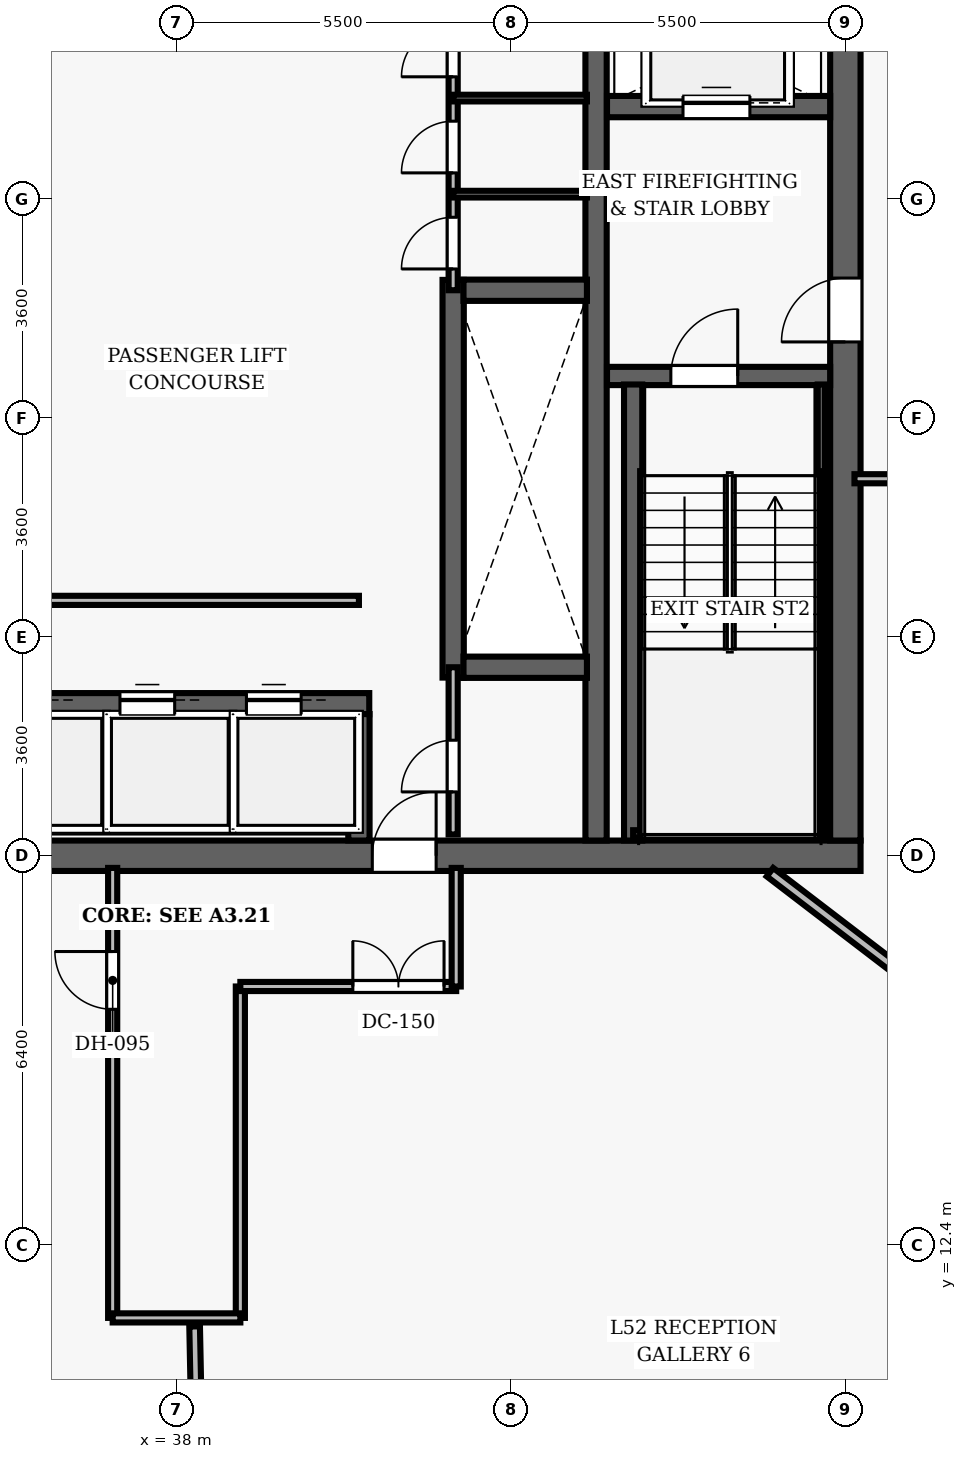
"""IFC4 building model, lengths in metres.
Left out: names, types, materials, properties, quantities, classifications, styles, units other than length and angle.
Written with IfcOpenShell. Run it as: python <this file> out.ifc"""

import sys

from ifc_helpers import new_model, si_unit, direction, frame, frame_2d, origin, place, context, subcontext, project, spatial, rectangle, extrude, element, fill, save


model = new_model("IFC4")
c1 = context("Model", 3, precision=1e-05, world=origin(), true_north=direction((0.0, 1.0)))
c2 = subcontext(c1, "Body", "Model", "MODEL_VIEW")
j1 = project(units=[si_unit("LENGTHUNIT", "METRE"), si_unit("PLANEANGLEUNIT", "RADIAN")], contexts=[c1])
p1 = place(None, origin())
s1 = spatial("IfcSite", under=j1, at=p1, CompositionType="ELEMENT")
p2 = place(p1, origin())
s2 = spatial("IfcBuilding", under=s1, at=p2, CompositionType="ELEMENT")
p3 = place(p2, frame((0.0, 0.0, 205.85)))
s3 = spatial("IfcBuildingStorey", under=s2, at=p3, CompositionType="ELEMENT", Elevation=205.85)
p4 = place(p3, frame((26.75, 18.8, 0.0), z_axis=(0.0, 0.0, 1.0), x_axis=(1.0, 0.0, 0.0)))
e1 = element("IfcWall", 1, at=p4, inside=s3, PredefinedType="SHEAR", context=c2, shape_type="SweptSolid", body=[
    extrude(rectangle(XDim=22.5, YDim=0.5, at=frame_2d((11.25, 0.0))), origin(), (0.0, 0.0, 1.0), 3.85),
])
p5 = place(p4, frame((14.47, 0.0, 0.0)))
e2 = element("IfcOpeningElement", 2, at=p5, cuts=e1, PredefinedType="OPENING", context=c2, shape_type="SweptSolid", body=[
    extrude(rectangle(XDim=1.05, YDim=2.15, at=frame_2d((0.525, 1.075))), frame((0.0, 0.26, 0.0), z_axis=(0.0, -1.0, 0.0), x_axis=(1.0, 0.0, 0.0)), (0.0, 0.0, 1.0), 0.52),
])
p6 = place(p3, frame((49.0, 19.05, 0.0), z_axis=(0.0, 0.0, 1.0), x_axis=(0.0, 1.0, 0.0)))
e3 = element("IfcWall", 3, at=p6, inside=s3, PredefinedType="SHEAR", context=c2, shape_type="SweptSolid", body=[
    extrude(rectangle(XDim=13.9, YDim=0.5, at=frame_2d((6.95, 0.0))), origin(), (0.0, 0.0, 1.0), 3.85),
])
p7 = place(p6, frame((8.2, 0.0, 0.0)))
e4 = element("IfcOpeningElement", 4, at=p7, cuts=e3, PredefinedType="OPENING", context=c2, shape_type="SweptSolid", body=[
    extrude(rectangle(XDim=1.05, YDim=2.15, at=frame_2d((0.525, 1.075))), frame((0.0, 0.26, 0.0), z_axis=(0.0, -1.0, 0.0), x_axis=(1.0, 0.0, 0.0)), (0.0, 0.0, 1.0), 0.52),
])
p8 = place(p3, frame((44.9, 19.05, 0.0), z_axis=(0.0, 0.0, 1.0), x_axis=(0.0, 1.0, 0.0)))
e5 = element("IfcWall", 5, at=p8, inside=s3, PredefinedType="SHEAR", context=c2, shape_type="SweptSolid", body=[
    extrude(rectangle(XDim=13.9, YDim=0.35, at=frame_2d((6.95, 0.0))), origin(), (0.0, 0.0, 1.0), 3.85),
])
p9 = place(p3, frame((45.08, 26.69, 0.0), z_axis=(0.0, 0.0, 1.0), x_axis=(1.0, 0.0, 0.0)))
e6 = element("IfcWall", 6, at=p9, inside=s3, PredefinedType="SHEAR", context=c2, shape_type="SweptSolid", body=[
    extrude(rectangle(XDim=3.67, YDim=0.3, at=frame_2d((1.835, 0.0))), origin(), (0.0, 0.0, 1.0), 3.85),
])
p10 = place(p9, frame((1.05, 0.0, 0.0)))
e7 = element("IfcOpeningElement", 7, at=p10, cuts=e6, PredefinedType="OPENING", context=c2, shape_type="SweptSolid", body=[
    extrude(rectangle(XDim=1.1, YDim=2.15, at=frame_2d((0.55, 1.075))), frame((0.0, 0.16, 0.0), z_axis=(0.0, -1.0, 0.0), x_axis=(1.0, 0.0, 0.0)), (0.0, 0.0, 1.0), 0.32),
])
p11 = place(p3, frame((45.51, 19.05, 0.0), z_axis=(0.0, 0.0, 1.0), x_axis=(0.0, 1.0, 0.0)))
e8 = element("IfcWall", 8, at=p11, inside=s3, PredefinedType="SHEAR", context=c2, shape_type="SweptSolid", body=[
    extrude(rectangle(XDim=7.5, YDim=0.3, at=frame_2d((3.75, 0.0))), origin(), (0.0, 0.0, 1.0), 3.85),
])
p12 = place(p3, frame((48.605, 19.1, 0.0), z_axis=(0.0, 0.0, 1.0), x_axis=(0.0, 1.0, 0.0)))
e9 = element("IfcWall", 9, at=p12, inside=s3, PredefinedType="SHEAR", context=c2, shape_type="SweptSolid", body=[
    extrude(rectangle(XDim=7.45, YDim=0.12, at=frame_2d((3.725, 0.0))), origin(), (0.0, 0.0, 1.0), 3.85),
])
p13 = place(p3, frame((45.51, 19.16, 0.0), z_axis=(0.0, 0.0, 1.0), x_axis=(1.0, 0.0, 0.0)))
e10 = element("IfcWall", 10, at=p13, inside=s3, PredefinedType="SHEAR", context=c2, shape_type="SweptSolid", body=[
    extrude(rectangle(XDim=3.095, YDim=0.12, at=frame_2d((1.547, 0.0))), origin(), (0.0, 0.0, 1.0), 3.85),
])
p14 = place(p3, frame((45.08, 31.12, 0.0), z_axis=(0.0, 0.0, 1.0), x_axis=(1.0, 0.0, 0.0)))
e11 = element("IfcWall", 11, at=p14, inside=s3, PredefinedType="SHEAR", context=c2, shape_type="SweptSolid", body=[
    extrude(rectangle(XDim=3.67, YDim=0.35, at=frame_2d((1.835, 0.0))), origin(), (0.0, 0.0, 1.0), 3.035),
])
p15 = place(p14, frame((1.25, 0.0, 0.0)))
e12 = element("IfcOpeningElement", 12, at=p15, cuts=e11, PredefinedType="OPENING", context=c2, shape_type="SweptSolid", body=[
    extrude(rectangle(XDim=1.1, YDim=2.15, at=frame_2d((0.55, 1.075))), frame((0.0, 0.185, 0.0), z_axis=(0.0, -1.0, 0.0), x_axis=(1.0, 0.0, 0.0)), (0.0, 0.0, 1.0), 0.37),
])
p16 = place(p3, frame((42.55, 21.73, 0.0), z_axis=(0.0, 0.0, 1.0), x_axis=(0.0, 1.0, 0.0)))
e13 = element("IfcWall", 13, at=p16, inside=s3, PredefinedType="SHEAR", context=c2, shape_type="SweptSolid", body=[
    extrude(rectangle(XDim=6.54, YDim=0.35, at=frame_2d((3.27, 0.0))), origin(), (0.0, 0.0, 1.0), 3.035),
])
for number, where, z_axis, x_axis in (
    (14, (42.72, 21.9, 0.0), (0.0, 0.0, 1.0), (1.0, 0.0, 0.0)),
    (15, (42.72, 28.1, 0.0), (0.0, 0.0, 1.0), (1.0, 0.0, 0.0)),
):
    element("IfcWall", number, at=place(p3, frame(where, z_axis=z_axis, x_axis=x_axis)), inside=s3, PredefinedType="SHEAR", context=c2, shape_type="SweptSolid", body=[
        extrude(rectangle(XDim=2.03, YDim=0.35, at=frame_2d((1.015, 0.0))), origin(), (0.0, 0.0, 1.0), 3.035),
    ])
p17 = place(p3, frame((34.49, 21.3, 0.0), z_axis=(0.0, 0.0, 1.0), x_axis=(1.0, 0.0, 0.0)))
e16 = element("IfcWall", 16, at=p17, inside=s3, PredefinedType="SHEAR", context=c2, shape_type="SweptSolid", body=[
    extrude(rectangle(XDim=6.68, YDim=0.35, at=frame_2d((3.34, 0.0))), origin(), (0.0, 0.0, 1.0), 3.035),
])
p18 = place(p17, frame((0.5, 0.0, 0.0)))
e17 = element("IfcOpeningElement", 17, at=p18, cuts=e16, PredefinedType="OPENING", context=c2, shape_type="SweptSolid", body=[
    extrude(rectangle(XDim=0.9, YDim=2.15, at=frame_2d((0.45, 1.075))), frame((0.0, 0.185, 0.0), z_axis=(0.0, -1.0, 0.0), x_axis=(1.0, 0.0, 0.0)), (0.0, 0.0, 1.0), 0.37),
])
p19 = place(p17, frame((2.58, 0.0, 0.0)))
e18 = element("IfcOpeningElement", 18, at=p19, cuts=e16, PredefinedType="OPENING", context=c2, shape_type="SweptSolid", body=[
    extrude(rectangle(XDim=0.9, YDim=2.15, at=frame_2d((0.45, 1.075))), frame((0.0, 0.185, 0.0), z_axis=(0.0, -1.0, 0.0), x_axis=(1.0, 0.0, 0.0)), (0.0, 0.0, 1.0), 0.37),
])
p20 = place(p17, frame((4.66, 0.0, 0.0)))
e19 = element("IfcOpeningElement", 19, at=p20, cuts=e16, PredefinedType="OPENING", context=c2, shape_type="SweptSolid", body=[
    extrude(rectangle(XDim=0.9, YDim=2.15, at=frame_2d((0.45, 1.075))), frame((0.0, 0.185, 0.0), z_axis=(0.0, -1.0, 0.0), x_axis=(1.0, 0.0, 0.0)), (0.0, 0.0, 1.0), 0.37),
])
p21 = place(p3, frame((41.0, 19.05, 0.0), z_axis=(0.0, 0.0, 1.0), x_axis=(0.0, 1.0, 0.0)))
e20 = element("IfcWall", 20, at=p21, inside=s3, PredefinedType="SHEAR", context=c2, shape_type="SweptSolid", body=[
    extrude(rectangle(XDim=2.08, YDim=0.35, at=frame_2d((1.04, 0.0))), origin(), (0.0, 0.0, 1.0), 3.035),
])
p22 = place(p3, frame((34.75, 23.0, 0.0), z_axis=(0.0, 0.0, 1.0), x_axis=(1.0, 0.0, 0.0)))
e21 = element("IfcWall", 21, at=p22, inside=s3, PredefinedType="PARTITIONING", context=c2, shape_type="SweptSolid", body=[
    extrude(rectangle(XDim=6.25, YDim=0.15, at=frame_2d((3.125, 0.0))), origin(), (0.0, 0.0, 1.0), 3.035),
])
p23 = place(p3, frame((42.55, 28.1, 0.0), z_axis=(0.0, 0.0, 1.0), x_axis=(0.0, 1.0, 0.0)))
e22 = element("IfcWall", 22, at=p23, inside=s3, PredefinedType="PARTITIONING", context=c2, shape_type="SweptSolid", body=[
    extrude(rectangle(XDim=4.75, YDim=0.15, at=frame_2d((2.375, 0.0))), origin(), (0.0, 0.0, 1.0), 3.035),
])
p24 = place(p23, frame((0.35, 0.0, 0.0)))
e23 = element("IfcOpeningElement", 23, at=p24, cuts=e22, PredefinedType="OPENING", context=c2, shape_type="SweptSolid", body=[
    extrude(rectangle(XDim=0.85, YDim=2.1, at=frame_2d((0.425, 1.05))), frame((0.0, 0.085, 0.0), z_axis=(0.0, -1.0, 0.0), x_axis=(1.0, 0.0, 0.0)), (0.0, 0.0, 1.0), 0.17),
])
p25 = place(p23, frame((1.93, 0.0, 0.0)))
e24 = element("IfcOpeningElement", 24, at=p25, cuts=e22, PredefinedType="OPENING", context=c2, shape_type="SweptSolid", body=[
    extrude(rectangle(XDim=0.85, YDim=2.1, at=frame_2d((0.425, 1.05))), frame((0.0, 0.085, 0.0), z_axis=(0.0, -1.0, 0.0), x_axis=(1.0, 0.0, 0.0)), (0.0, 0.0, 1.0), 0.17),
])
p26 = place(p23, frame((3.51, 0.0, 0.0)))
e25 = element("IfcOpeningElement", 25, at=p26, cuts=e22, PredefinedType="OPENING", context=c2, shape_type="SweptSolid", body=[
    extrude(rectangle(XDim=0.85, YDim=2.1, at=frame_2d((0.425, 1.05))), frame((0.0, 0.085, 0.0), z_axis=(0.0, -1.0, 0.0), x_axis=(1.0, 0.0, 0.0)), (0.0, 0.0, 1.0), 0.17),
])
for number, where, z_axis, x_axis in (
    (26, (42.55, 29.68, 0.0), (0.0, 0.0, 1.0), (1.0, 0.0, 0.0)),
    (27, (42.55, 31.26, 0.0), (0.0, 0.0, 1.0), (1.0, 0.0, 0.0)),
):
    element("IfcWall", number, at=place(p3, frame(where, z_axis=z_axis, x_axis=x_axis)), inside=s3, PredefinedType="PARTITIONING", context=c2, shape_type="SweptSolid", body=[
        extrude(rectangle(XDim=2.2, YDim=0.11, at=frame_2d((1.1, 0.0))), origin(), (0.0, 0.0, 1.0), 3.035),
    ])
p27 = place(p3, frame((42.55, 19.15, 0.0), z_axis=(0.0, 0.0, 1.0), x_axis=(0.0, 1.0, 0.0)))
e28 = element("IfcWall", 28, at=p27, inside=s3, PredefinedType="PARTITIONING", context=c2, shape_type="SweptSolid", body=[
    extrude(rectangle(XDim=2.75, YDim=0.15, at=frame_2d((1.375, 0.0))), origin(), (0.0, 0.0, 1.0), 3.035),
])
p28 = place(p27, frame((0.7, 0.0, 0.0)))
e29 = element("IfcOpeningElement", 29, at=p28, cuts=e28, PredefinedType="OPENING", context=c2, shape_type="SweptSolid", body=[
    extrude(rectangle(XDim=0.85, YDim=2.1, at=frame_2d((0.425, 1.05))), frame((0.0, 0.085, 0.0), z_axis=(0.0, -1.0, 0.0), x_axis=(1.0, 0.0, 0.0)), (0.0, 0.0, 1.0), 0.17),
])
p29 = place(p3, frame((49.15, 25.0, 0.0), z_axis=(0.0, 0.0, 1.0), x_axis=(1.0, 0.0, 0.0)))
e30 = element("IfcWall", 30, at=p29, inside=s3, PredefinedType="PARTITIONING", context=c2, shape_type="SweptSolid", body=[
    extrude(rectangle(XDim=9.038, YDim=0.15, at=frame_2d((4.519, 0.0))), origin(), (0.0, 0.0, 1.0), 3.035),
])
p30 = place(p29, frame((1.784, 0.0, 0.0)))
e31 = element("IfcOpeningElement", 31, at=p30, cuts=e30, PredefinedType="OPENING", context=c2, shape_type="SweptSolid", body=[
    extrude(rectangle(XDim=0.95, YDim=2.15, at=frame_2d((0.475, 1.075))), frame((0.0, 0.085, 0.0), z_axis=(0.0, -1.0, 0.0), x_axis=(1.0, 0.0, 0.0)), (0.0, 0.0, 1.0), 0.17),
])
p31 = place(p3, frame((36.95, 11.2, 0.0), z_axis=(0.0, 0.0, 1.0), x_axis=(0.0, 1.0, 0.0)))
e32 = element("IfcWall", 32, at=p31, inside=s3, PredefinedType="PARTITIONING", context=c2, shape_type="SweptSolid", body=[
    extrude(rectangle(XDim=7.4, YDim=0.15, at=frame_2d((3.7, 0.0))), origin(), (0.0, 0.0, 1.0), 3.035),
])
p32 = place(p31, frame((5.075, 0.0, 0.0)))
e33 = element("IfcOpeningElement", 33, at=p32, cuts=e32, PredefinedType="OPENING", context=c2, shape_type="SweptSolid", body=[
    extrude(rectangle(XDim=0.95, YDim=2.15, at=frame_2d((0.475, 1.075))), frame((0.0, 0.085, 0.0), z_axis=(0.0, -1.0, 0.0), x_axis=(1.0, 0.0, 0.0)), (0.0, 0.0, 1.0), 0.17),
])
p33 = place(p3, frame((39.05, 11.2, 0.0), z_axis=(0.0, 0.0, 1.0), x_axis=(0.0, 1.0, 0.0)))
e34 = element("IfcWall", 34, at=p33, inside=s3, PredefinedType="PARTITIONING", context=c2, shape_type="SweptSolid", body=[
    extrude(rectangle(XDim=5.45, YDim=0.15, at=frame_2d((2.725, 0.0))), origin(), (0.0, 0.0, 1.0), 3.035),
])
p34 = place(p3, frame((39.05, 16.65, 0.0), z_axis=(0.0, 0.0, 1.0), x_axis=(1.0, 0.0, 0.0)))
e35 = element("IfcWall", 35, at=p34, inside=s3, PredefinedType="PARTITIONING", context=c2, shape_type="SweptSolid", body=[
    extrude(rectangle(XDim=3.55, YDim=0.15, at=frame_2d((1.775, 0.0))), origin(), (0.0, 0.0, 1.0), 3.035),
])
p35 = place(p34, frame((1.85, 0.0, 0.0)))
e36 = element("IfcOpeningElement", 36, at=p35, cuts=e35, PredefinedType="OPENING", context=c2, shape_type="SweptSolid", body=[
    extrude(rectangle(XDim=1.5, YDim=2.2, at=frame_2d((0.75, 1.1))), frame((0.0, 0.085, 0.0), z_axis=(0.0, -1.0, 0.0), x_axis=(1.0, 0.0, 0.0)), (0.0, 0.0, 1.0), 0.17),
])
p36 = place(p3, frame((42.6, 16.65, 0.0), z_axis=(0.0, 0.0, 1.0), x_axis=(0.0, 1.0, 0.0)))
e37 = element("IfcWall", 37, at=p36, inside=s3, PredefinedType="PARTITIONING", context=c2, shape_type="SweptSolid", body=[
    extrude(rectangle(XDim=1.95, YDim=0.15, at=frame_2d((0.975, 0.0))), origin(), (0.0, 0.0, 1.0), 3.035),
])
p37 = place(p3, frame((36.95, 11.2, 0.0), z_axis=(0.0, 0.0, 1.0), x_axis=(1.0, 0.0, 0.0)))
e38 = element("IfcWall", 38, at=p37, inside=s3, PredefinedType="PARTITIONING", context=c2, shape_type="SweptSolid", body=[
    extrude(rectangle(XDim=2.1, YDim=0.15, at=frame_2d((1.05, 0.0))), origin(), (0.0, 0.0, 1.0), 3.035),
])
p38 = place(p3, frame((38.298, 11.06, 0.0), z_axis=(0.0, 0.0, 1.0), x_axis=(0.019932501838, -0.99980132795, 0.0)))
e39 = element("IfcWall", 39, at=p38, inside=s3, PredefinedType="PARTITIONING", context=c2, shape_type="SweptSolid", body=[
    extrude(rectangle(XDim=7.533, YDim=0.175, at=frame_2d((3.766, 0.0))), origin(), (0.0, 0.0, 1.0), 3.035),
])
p39 = place(p3, frame((47.76, 18.53, 0.0), z_axis=(0.0, 0.0, 1.0), x_axis=(0.794107620506, -0.607777168916, 0.0)))
e40 = element("IfcWall", 40, at=p39, inside=s3, PredefinedType="PARTITIONING", context=c2, shape_type="SweptSolid", body=[
    extrude(rectangle(XDim=13.547, YDim=0.175, at=frame_2d((6.773, 0.0))), origin(), (0.0, 0.0, 1.0), 3.035),
])
p40 = place(p10, origin())
e41 = element("IfcDoor", 41, at=p40, inside=s3, OperationType="SINGLE_SWING_RIGHT", PredefinedType="DOOR", context=c2, shape_type="SweptSolid", body=[
    extrude(rectangle(XDim=1.1, YDim=2.15, at=frame_2d((0.55, 1.075))), frame((0.0, 0.025, 0.0), z_axis=(0.0, -1.0, 0.0), x_axis=(1.0, 0.0, 0.0)), (0.0, 0.0, 1.0), 0.05),
])
fill(e7, e41)
p41 = place(p7, origin())
e42 = element("IfcDoor", 42, at=p41, inside=s3, OperationType="SINGLE_SWING_LEFT", PredefinedType="DOOR", context=c2, shape_type="SweptSolid", body=[
    extrude(rectangle(XDim=1.05, YDim=2.15, at=frame_2d((0.525, 1.075))), frame((0.0, 0.025, 0.0), z_axis=(0.0, -1.0, 0.0), x_axis=(1.0, 0.0, 0.0)), (0.0, 0.0, 1.0), 0.05),
])
fill(e4, e42)
p42 = place(p5, origin())
e43 = element("IfcDoor", 43, at=p42, inside=s3, OperationType="SINGLE_SWING_RIGHT", PredefinedType="DOOR", context=c2, shape_type="SweptSolid", body=[
    extrude(rectangle(XDim=1.05, YDim=2.15, at=frame_2d((0.525, 1.075))), frame((0.0, 0.025, 0.0), z_axis=(0.0, -1.0, 0.0), x_axis=(1.0, 0.0, 0.0)), (0.0, 0.0, 1.0), 0.05),
])
fill(e2, e43)
p43 = place(p24, origin())
e44 = element("IfcDoor", 44, at=p43, inside=s3, OperationType="SINGLE_SWING_LEFT", PredefinedType="DOOR", context=c2, shape_type="SweptSolid", body=[
    extrude(rectangle(XDim=0.85, YDim=2.1, at=frame_2d((0.425, 1.05))), frame((0.0, 0.025, 0.0), z_axis=(0.0, -1.0, 0.0), x_axis=(1.0, 0.0, 0.0)), (0.0, 0.0, 1.0), 0.05),
])
fill(e23, e44)
p44 = place(p25, origin())
e45 = element("IfcDoor", 45, at=p44, inside=s3, OperationType="SINGLE_SWING_LEFT", PredefinedType="DOOR", context=c2, shape_type="SweptSolid", body=[
    extrude(rectangle(XDim=0.85, YDim=2.1, at=frame_2d((0.425, 1.05))), frame((0.0, 0.025, 0.0), z_axis=(0.0, -1.0, 0.0), x_axis=(1.0, 0.0, 0.0)), (0.0, 0.0, 1.0), 0.05),
])
fill(e24, e45)
p45 = place(p26, origin())
e46 = element("IfcDoor", 46, at=p45, inside=s3, OperationType="SINGLE_SWING_LEFT", PredefinedType="DOOR", context=c2, shape_type="SweptSolid", body=[
    extrude(rectangle(XDim=0.85, YDim=2.1, at=frame_2d((0.425, 1.05))), frame((0.0, 0.025, 0.0), z_axis=(0.0, -1.0, 0.0), x_axis=(1.0, 0.0, 0.0)), (0.0, 0.0, 1.0), 0.05),
])
fill(e25, e46)
p46 = place(p28, origin())
e47 = element("IfcDoor", 47, at=p46, inside=s3, OperationType="SINGLE_SWING_LEFT", PredefinedType="DOOR", context=c2, shape_type="SweptSolid", body=[
    extrude(rectangle(XDim=0.85, YDim=2.1, at=frame_2d((0.425, 1.05))), frame((0.0, 0.025, 0.0), z_axis=(0.0, -1.0, 0.0), x_axis=(1.0, 0.0, 0.0)), (0.0, 0.0, 1.0), 0.05),
])
fill(e29, e47)
p47 = place(p32, origin())
e48 = element("IfcDoor", 48, at=p47, inside=s3, OperationType="SINGLE_SWING_RIGHT", PredefinedType="DOOR", context=c2, shape_type="SweptSolid", body=[
    extrude(rectangle(XDim=0.95, YDim=2.15, at=frame_2d((0.475, 1.075))), frame((0.0, 0.025, 0.0), z_axis=(0.0, -1.0, 0.0), x_axis=(1.0, 0.0, 0.0)), (0.0, 0.0, 1.0), 0.05),
])
fill(e33, e48)
p48 = place(p35, origin())
e49 = element("IfcDoor", 49, at=p48, inside=s3, OperationType="DOUBLE_DOOR_SINGLE_SWING", PredefinedType="DOOR", context=c2, shape_type="SweptSolid", body=[
    extrude(rectangle(XDim=1.5, YDim=2.2, at=frame_2d((0.75, 1.1))), frame((0.0, 0.025, 0.0), z_axis=(0.0, -1.0, 0.0), x_axis=(1.0, 0.0, 0.0)), (0.0, 0.0, 1.0), 0.05),
])
fill(e36, e49)
p49 = place(p19, origin())
e50 = element("IfcDoor", 50, at=p49, inside=s3, OperationType="SLIDING_TO_LEFT", PredefinedType="DOOR", context=c2, shape_type="SweptSolid", body=[
    extrude(rectangle(XDim=0.9, YDim=2.15, at=frame_2d((0.45, 1.075))), frame((0.0, 0.025, 0.0), z_axis=(0.0, -1.0, 0.0), x_axis=(1.0, 0.0, 0.0)), (0.0, 0.0, 1.0), 0.05),
])
fill(e18, e50)
p50 = place(p20, origin())
e51 = element("IfcDoor", 51, at=p50, inside=s3, OperationType="SLIDING_TO_LEFT", PredefinedType="DOOR", context=c2, shape_type="SweptSolid", body=[
    extrude(rectangle(XDim=0.9, YDim=2.15, at=frame_2d((0.45, 1.075))), frame((0.0, 0.025, 0.0), z_axis=(0.0, -1.0, 0.0), x_axis=(1.0, 0.0, 0.0)), (0.0, 0.0, 1.0), 0.05),
])
fill(e19, e51)
p51 = place(p15, origin())
e52 = element("IfcDoor", 52, at=p51, inside=s3, OperationType="SLIDING_TO_LEFT", PredefinedType="DOOR", context=c2, shape_type="SweptSolid", body=[
    extrude(rectangle(XDim=1.1, YDim=2.15, at=frame_2d((0.55, 1.075))), frame((0.0, 0.025, 0.0), z_axis=(0.0, -1.0, 0.0), x_axis=(1.0, 0.0, 0.0)), (0.0, 0.0, 1.0), 0.05),
])
fill(e12, e52)
save(model, sys.argv[1])
